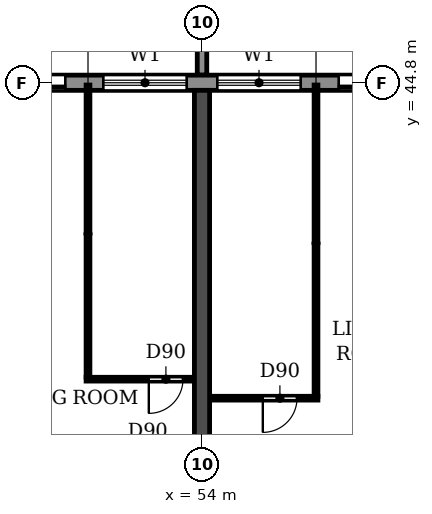
"""IFC4 building model, lengths in metres.
Left out: names, types, materials, properties, quantities, classifications, styles, units other than length and angle.
Written with IfcOpenShell. Run it as: python <this file> out.ifc"""

import sys

from ifc_helpers import new_model, si_unit, direction, frame, frame_2d, origin, place, context, subcontext, project, spatial, polyline, rectangle, outline, extrude, source, transform, mapped, element, fill, save


model = new_model("IFC4")
c1 = context("Model", 3, precision=1e-05, world=origin(), true_north=direction((0.0, 1.0)))
c2 = subcontext(c1, "Body", "Model", "MODEL_VIEW")
j1 = project(units=[si_unit("LENGTHUNIT", "METRE"), si_unit("PLANEANGLEUNIT", "RADIAN")], contexts=[c1])
p1 = place(None, origin())
s1 = spatial("IfcSite", under=j1, at=p1, CompositionType="ELEMENT")
p2 = place(p1, origin())
s2 = spatial("IfcBuilding", under=s1, at=p2, CompositionType="ELEMENT")
p3 = place(p2, frame((0.0, 0.0, 26.7)))
s3 = spatial("IfcBuildingStorey", under=s2, at=p3, CompositionType="ELEMENT", Elevation=26.7)
p4 = place(p3, frame((54.0, 30.55, 0.0), z_axis=(0.0, 0.0, 1.0), x_axis=(0.0, 1.0, 0.0)))
e1 = element("IfcWall", 1, at=p4, inside=s3, PredefinedType="SHEAR", context=c2, shape_type="SweptSolid", body=[
    extrude(rectangle(XDim=14.05, YDim=0.4, at=frame_2d((7.025, 0.0))), origin(), (0.0, 0.0, 1.0), 3.05),
])
p5 = place(p3, frame((97.317, 44.8, 0.0), z_axis=(0.0, 0.0, 1.0), x_axis=(-1.0, 0.0, 0.0)))
e2 = element("IfcWall", 2, at=p5, inside=s3, PredefinedType="STANDARD", context=c2, shape_type="SweptSolid", body=[
    extrude(rectangle(XDim=92.634, YDim=0.4, at=frame_2d((46.317, 0.0))), origin(), (0.0, 0.0, 1.0), 3.05),
])
p6 = place(p5, frame((88.717, 0.0, 0.9)))
e3 = element("IfcOpeningElement", 3, at=p6, cuts=e2, PredefinedType="OPENING", context=c2, shape_type="SweptSolid", body=[
    extrude(rectangle(XDim=2.2, YDim=1.5, at=frame_2d((1.1, 0.75))), frame((0.0, 0.21, 0.0), z_axis=(0.0, -1.0, 0.0), x_axis=(1.0, 0.0, 0.0)), (0.0, 0.0, 1.0), 0.42),
])
p7 = place(p5, frame((85.917, 0.0, 0.0)))
e4 = element("IfcOpeningElement", 4, at=p7, cuts=e2, PredefinedType="OPENING", context=c2, shape_type="SweptSolid", body=[
    extrude(rectangle(XDim=1.8, YDim=2.4, at=frame_2d((0.9, 1.2))), frame((0.0, 0.21, 0.0), z_axis=(0.0, -1.0, 0.0), x_axis=(1.0, 0.0, 0.0)), (0.0, 0.0, 1.0), 0.42),
])
p8 = place(p5, frame((82.717, 0.0, 0.9)))
e5 = element("IfcOpeningElement", 5, at=p8, cuts=e2, PredefinedType="OPENING", context=c2, shape_type="SweptSolid", body=[
    extrude(rectangle(XDim=2.2, YDim=1.5, at=frame_2d((1.1, 0.75))), frame((0.0, 0.21, 0.0), z_axis=(0.0, -1.0, 0.0), x_axis=(1.0, 0.0, 0.0)), (0.0, 0.0, 1.0), 0.42),
])
p9 = place(p5, frame((79.717, 0.0, 0.9)))
e6 = element("IfcOpeningElement", 6, at=p9, cuts=e2, PredefinedType="OPENING", context=c2, shape_type="SweptSolid", body=[
    extrude(rectangle(XDim=2.2, YDim=1.5, at=frame_2d((1.1, 0.75))), frame((0.0, 0.21, 0.0), z_axis=(0.0, -1.0, 0.0), x_axis=(1.0, 0.0, 0.0)), (0.0, 0.0, 1.0), 0.42),
])
p10 = place(p5, frame((76.917, 0.0, 0.0)))
e7 = element("IfcOpeningElement", 7, at=p10, cuts=e2, PredefinedType="OPENING", context=c2, shape_type="SweptSolid", body=[
    extrude(rectangle(XDim=1.8, YDim=2.4, at=frame_2d((0.9, 1.2))), frame((0.0, 0.21, 0.0), z_axis=(0.0, -1.0, 0.0), x_axis=(1.0, 0.0, 0.0)), (0.0, 0.0, 1.0), 0.42),
])
p11 = place(p5, frame((73.717, 0.0, 0.9)))
e8 = element("IfcOpeningElement", 8, at=p11, cuts=e2, PredefinedType="OPENING", context=c2, shape_type="SweptSolid", body=[
    extrude(rectangle(XDim=2.2, YDim=1.5, at=frame_2d((1.1, 0.75))), frame((0.0, 0.21, 0.0), z_axis=(0.0, -1.0, 0.0), x_axis=(1.0, 0.0, 0.0)), (0.0, 0.0, 1.0), 0.42),
])
p12 = place(p5, frame((70.717, 0.0, 0.9)))
e9 = element("IfcOpeningElement", 9, at=p12, cuts=e2, PredefinedType="OPENING", context=c2, shape_type="SweptSolid", body=[
    extrude(rectangle(XDim=2.2, YDim=1.5, at=frame_2d((1.1, 0.75))), frame((0.0, 0.21, 0.0), z_axis=(0.0, -1.0, 0.0), x_axis=(1.0, 0.0, 0.0)), (0.0, 0.0, 1.0), 0.42),
])
p13 = place(p5, frame((67.717, 0.0, 0.9)))
e10 = element("IfcOpeningElement", 10, at=p13, cuts=e2, PredefinedType="OPENING", context=c2, shape_type="SweptSolid", body=[
    extrude(rectangle(XDim=2.2, YDim=1.5, at=frame_2d((1.1, 0.75))), frame((0.0, 0.21, 0.0), z_axis=(0.0, -1.0, 0.0), x_axis=(1.0, 0.0, 0.0)), (0.0, 0.0, 1.0), 0.42),
])
p14 = place(p5, frame((64.917, 0.0, 0.0)))
e11 = element("IfcOpeningElement", 11, at=p14, cuts=e2, PredefinedType="OPENING", context=c2, shape_type="SweptSolid", body=[
    extrude(rectangle(XDim=1.8, YDim=2.4, at=frame_2d((0.9, 1.2))), frame((0.0, 0.21, 0.0), z_axis=(0.0, -1.0, 0.0), x_axis=(1.0, 0.0, 0.0)), (0.0, 0.0, 1.0), 0.42),
])
p15 = place(p5, frame((61.717, 0.0, 0.9)))
e12 = element("IfcOpeningElement", 12, at=p15, cuts=e2, PredefinedType="OPENING", context=c2, shape_type="SweptSolid", body=[
    extrude(rectangle(XDim=2.2, YDim=1.5, at=frame_2d((1.1, 0.75))), frame((0.0, 0.21, 0.0), z_axis=(0.0, -1.0, 0.0), x_axis=(1.0, 0.0, 0.0)), (0.0, 0.0, 1.0), 0.42),
])
p16 = place(p5, frame((58.717, 0.0, 0.9)))
e13 = element("IfcOpeningElement", 13, at=p16, cuts=e2, PredefinedType="OPENING", context=c2, shape_type="SweptSolid", body=[
    extrude(rectangle(XDim=2.2, YDim=1.5, at=frame_2d((1.1, 0.75))), frame((0.0, 0.21, 0.0), z_axis=(0.0, -1.0, 0.0), x_axis=(1.0, 0.0, 0.0)), (0.0, 0.0, 1.0), 0.42),
])
p17 = place(p5, frame((55.917, 0.0, 0.0)))
e14 = element("IfcOpeningElement", 14, at=p17, cuts=e2, PredefinedType="OPENING", context=c2, shape_type="SweptSolid", body=[
    extrude(rectangle(XDim=1.8, YDim=2.4, at=frame_2d((0.9, 1.2))), frame((0.0, 0.21, 0.0), z_axis=(0.0, -1.0, 0.0), x_axis=(1.0, 0.0, 0.0)), (0.0, 0.0, 1.0), 0.42),
])
p18 = place(p5, frame((52.917, 0.0, 0.0)))
e15 = element("IfcOpeningElement", 15, at=p18, cuts=e2, PredefinedType="OPENING", context=c2, shape_type="SweptSolid", body=[
    extrude(rectangle(XDim=1.8, YDim=2.4, at=frame_2d((0.9, 1.2))), frame((0.0, 0.21, 0.0), z_axis=(0.0, -1.0, 0.0), x_axis=(1.0, 0.0, 0.0)), (0.0, 0.0, 1.0), 0.42),
])
p19 = place(p5, frame((49.717, 0.0, 0.9)))
e16 = element("IfcOpeningElement", 16, at=p19, cuts=e2, PredefinedType="OPENING", context=c2, shape_type="SweptSolid", body=[
    extrude(rectangle(XDim=2.2, YDim=1.5, at=frame_2d((1.1, 0.75))), frame((0.0, 0.21, 0.0), z_axis=(0.0, -1.0, 0.0), x_axis=(1.0, 0.0, 0.0)), (0.0, 0.0, 1.0), 0.42),
])
p20 = place(p5, frame((46.917, 0.0, 0.0)))
e17 = element("IfcOpeningElement", 17, at=p20, cuts=e2, PredefinedType="OPENING", context=c2, shape_type="SweptSolid", body=[
    extrude(rectangle(XDim=1.8, YDim=2.4, at=frame_2d((0.9, 1.2))), frame((0.0, 0.21, 0.0), z_axis=(0.0, -1.0, 0.0), x_axis=(1.0, 0.0, 0.0)), (0.0, 0.0, 1.0), 0.42),
])
p21 = place(p5, frame((43.717, 0.0, 0.9)))
e18 = element("IfcOpeningElement", 18, at=p21, cuts=e2, PredefinedType="OPENING", context=c2, shape_type="SweptSolid", body=[
    extrude(rectangle(XDim=2.2, YDim=1.5, at=frame_2d((1.1, 0.75))), frame((0.0, 0.21, 0.0), z_axis=(0.0, -1.0, 0.0), x_axis=(1.0, 0.0, 0.0)), (0.0, 0.0, 1.0), 0.42),
])
p22 = place(p5, frame((40.717, 0.0, 0.9)))
e19 = element("IfcOpeningElement", 19, at=p22, cuts=e2, PredefinedType="OPENING", context=c2, shape_type="SweptSolid", body=[
    extrude(rectangle(XDim=2.2, YDim=1.5, at=frame_2d((1.1, 0.75))), frame((0.0, 0.21, 0.0), z_axis=(0.0, -1.0, 0.0), x_axis=(1.0, 0.0, 0.0)), (0.0, 0.0, 1.0), 0.42),
])
p23 = place(p5, frame((37.917, 0.0, 0.0)))
e20 = element("IfcOpeningElement", 20, at=p23, cuts=e2, PredefinedType="OPENING", context=c2, shape_type="SweptSolid", body=[
    extrude(rectangle(XDim=1.8, YDim=2.4, at=frame_2d((0.9, 1.2))), frame((0.0, 0.21, 0.0), z_axis=(0.0, -1.0, 0.0), x_axis=(1.0, 0.0, 0.0)), (0.0, 0.0, 1.0), 0.42),
])
p24 = place(p5, frame((34.917, 0.0, 0.0)))
e21 = element("IfcOpeningElement", 21, at=p24, cuts=e2, PredefinedType="OPENING", context=c2, shape_type="SweptSolid", body=[
    extrude(rectangle(XDim=1.8, YDim=2.4, at=frame_2d((0.9, 1.2))), frame((0.0, 0.21, 0.0), z_axis=(0.0, -1.0, 0.0), x_axis=(1.0, 0.0, 0.0)), (0.0, 0.0, 1.0), 0.42),
])
p25 = place(p5, frame((31.717, 0.0, 0.9)))
e22 = element("IfcOpeningElement", 22, at=p25, cuts=e2, PredefinedType="OPENING", context=c2, shape_type="SweptSolid", body=[
    extrude(rectangle(XDim=2.2, YDim=1.5, at=frame_2d((1.1, 0.75))), frame((0.0, 0.21, 0.0), z_axis=(0.0, -1.0, 0.0), x_axis=(1.0, 0.0, 0.0)), (0.0, 0.0, 1.0), 0.42),
])
p26 = place(p5, frame((28.717, 0.0, 0.9)))
e23 = element("IfcOpeningElement", 23, at=p26, cuts=e2, PredefinedType="OPENING", context=c2, shape_type="SweptSolid", body=[
    extrude(rectangle(XDim=2.2, YDim=1.5, at=frame_2d((1.1, 0.75))), frame((0.0, 0.21, 0.0), z_axis=(0.0, -1.0, 0.0), x_axis=(1.0, 0.0, 0.0)), (0.0, 0.0, 1.0), 0.42),
])
p27 = place(p5, frame((25.717, 0.0, 0.9)))
e24 = element("IfcOpeningElement", 24, at=p27, cuts=e2, PredefinedType="OPENING", context=c2, shape_type="SweptSolid", body=[
    extrude(rectangle(XDim=2.2, YDim=1.5, at=frame_2d((1.1, 0.75))), frame((0.0, 0.21, 0.0), z_axis=(0.0, -1.0, 0.0), x_axis=(1.0, 0.0, 0.0)), (0.0, 0.0, 1.0), 0.42),
])
p28 = place(p5, frame((22.717, 0.0, 0.9)))
e25 = element("IfcOpeningElement", 25, at=p28, cuts=e2, PredefinedType="OPENING", context=c2, shape_type="SweptSolid", body=[
    extrude(rectangle(XDim=2.2, YDim=1.5, at=frame_2d((1.1, 0.75))), frame((0.0, 0.21, 0.0), z_axis=(0.0, -1.0, 0.0), x_axis=(1.0, 0.0, 0.0)), (0.0, 0.0, 1.0), 0.42),
])
p29 = place(p5, frame((19.917, 0.0, 0.0)))
e26 = element("IfcOpeningElement", 26, at=p29, cuts=e2, PredefinedType="OPENING", context=c2, shape_type="SweptSolid", body=[
    extrude(rectangle(XDim=1.8, YDim=2.4, at=frame_2d((0.9, 1.2))), frame((0.0, 0.21, 0.0), z_axis=(0.0, -1.0, 0.0), x_axis=(1.0, 0.0, 0.0)), (0.0, 0.0, 1.0), 0.42),
])
p30 = place(p5, frame((16.717, 0.0, 0.9)))
e27 = element("IfcOpeningElement", 27, at=p30, cuts=e2, PredefinedType="OPENING", context=c2, shape_type="SweptSolid", body=[
    extrude(rectangle(XDim=2.2, YDim=1.5, at=frame_2d((1.1, 0.75))), frame((0.0, 0.21, 0.0), z_axis=(0.0, -1.0, 0.0), x_axis=(1.0, 0.0, 0.0)), (0.0, 0.0, 1.0), 0.42),
])
p31 = place(p5, frame((13.717, 0.0, 0.9)))
e28 = element("IfcOpeningElement", 28, at=p31, cuts=e2, PredefinedType="OPENING", context=c2, shape_type="SweptSolid", body=[
    extrude(rectangle(XDim=2.2, YDim=1.5, at=frame_2d((1.1, 0.75))), frame((0.0, 0.21, 0.0), z_axis=(0.0, -1.0, 0.0), x_axis=(1.0, 0.0, 0.0)), (0.0, 0.0, 1.0), 0.42),
])
p32 = place(p5, frame((10.717, 0.0, 0.9)))
e29 = element("IfcOpeningElement", 29, at=p32, cuts=e2, PredefinedType="OPENING", context=c2, shape_type="SweptSolid", body=[
    extrude(rectangle(XDim=2.2, YDim=1.5, at=frame_2d((1.1, 0.75))), frame((0.0, 0.21, 0.0), z_axis=(0.0, -1.0, 0.0), x_axis=(1.0, 0.0, 0.0)), (0.0, 0.0, 1.0), 0.42),
])
p33 = place(p5, frame((7.917, 0.0, 0.0)))
e30 = element("IfcOpeningElement", 30, at=p33, cuts=e2, PredefinedType="OPENING", context=c2, shape_type="SweptSolid", body=[
    extrude(rectangle(XDim=1.8, YDim=2.4, at=frame_2d((0.9, 1.2))), frame((0.0, 0.21, 0.0), z_axis=(0.0, -1.0, 0.0), x_axis=(1.0, 0.0, 0.0)), (0.0, 0.0, 1.0), 0.42),
])
p34 = place(p5, frame((4.917, 0.0, 0.0)))
e31 = element("IfcOpeningElement", 31, at=p34, cuts=e2, PredefinedType="OPENING", context=c2, shape_type="SweptSolid", body=[
    extrude(rectangle(XDim=1.8, YDim=2.4, at=frame_2d((0.9, 1.2))), frame((0.0, 0.21, 0.0), z_axis=(0.0, -1.0, 0.0), x_axis=(1.0, 0.0, 0.0)), (0.0, 0.0, 1.0), 0.42),
])
p35 = place(p5, frame((1.717, 0.0, 0.9)))
e32 = element("IfcOpeningElement", 32, at=p35, cuts=e2, PredefinedType="OPENING", context=c2, shape_type="SweptSolid", body=[
    extrude(rectangle(XDim=2.2, YDim=1.5, at=frame_2d((1.1, 0.75))), frame((0.0, 0.21, 0.0), z_axis=(0.0, -1.0, 0.0), x_axis=(1.0, 0.0, 0.0)), (0.0, 0.0, 1.0), 0.42),
])
m1 = source(origin(), c2, "Body", "SweptSolid", [
    extrude(outline(polyline([(0.0, 0.0), (0.25, 0.0), (0.25, 3.1), (0.0, 3.1), (0.0, 0.0)])), origin(), (0.0, 0.0, 1.0), 3.1),
])
p36 = place(p3, frame((53.875, 45.0, 0.0)))
e33 = element("IfcWall", 33, at=p36, inside=s3, PredefinedType="STANDARD", context=c2, shape_type="MappedRepresentation", body=[
    mapped(m1, transform((0.0, 0.0, 0.0))),
])
p37 = place(p3, frame((54.21, 36.5, 0.0), z_axis=(0.0, 0.0, 1.0), x_axis=(1.0, 0.0, 0.0)))
e34 = element("IfcWall", 34, at=p37, inside=s3, PredefinedType="PARTITIONING", context=c2, shape_type="SweptSolid", body=[
    extrude(rectangle(XDim=2.84, YDim=0.1, at=frame_2d((1.42, 0.0))), origin(), (0.0, 0.0, 1.0), 3.05),
])
p38 = place(p37, frame((1.39, 0.0, 0.0)))
e35 = element("IfcOpeningElement", 35, at=p38, cuts=e34, PredefinedType="OPENING", context=c2, shape_type="SweptSolid", body=[
    extrude(rectangle(XDim=0.9, YDim=2.1, at=frame_2d((0.45, 1.05))), frame((0.0, 0.06, 0.0), z_axis=(0.0, -1.0, 0.0), x_axis=(1.0, 0.0, 0.0)), (0.0, 0.0, 1.0), 0.12),
])
p39 = place(p3, frame((50.95, 37.0, 0.0), z_axis=(0.0, 0.0, 1.0), x_axis=(1.0, 0.0, 0.0)))
e36 = element("IfcWall", 36, at=p39, inside=s3, PredefinedType="PARTITIONING", context=c2, shape_type="SweptSolid", body=[
    extrude(rectangle(XDim=2.84, YDim=0.1, at=frame_2d((1.42, 0.0))), origin(), (0.0, 0.0, 1.0), 3.05),
])
p40 = place(p39, frame((1.65, 0.0, 0.0)))
e37 = element("IfcOpeningElement", 37, at=p40, cuts=e36, PredefinedType="OPENING", context=c2, shape_type="SweptSolid", body=[
    extrude(rectangle(XDim=0.9, YDim=2.1, at=frame_2d((0.45, 1.05))), frame((0.0, 0.06, 0.0), z_axis=(0.0, -1.0, 0.0), x_axis=(1.0, 0.0, 0.0)), (0.0, 0.0, 1.0), 0.12),
])
p41 = place(p3, frame((51.0, 37.05, 0.0), z_axis=(0.0, 0.0, 1.0), x_axis=(0.0, 1.0, 0.0)))
e38 = element("IfcWall", 38, at=p41, inside=s3, PredefinedType="PARTITIONING", context=c2, shape_type="SweptSolid", body=[
    extrude(rectangle(XDim=7.69, YDim=0.1, at=frame_2d((3.845, 0.0))), origin(), (0.0, 0.0, 1.0), 3.05),
])
p42 = place(p3, frame((57.0, 36.55, 0.0), z_axis=(0.0, 0.0, 1.0), x_axis=(0.0, 1.0, 0.0)))
e39 = element("IfcWall", 39, at=p42, inside=s3, PredefinedType="PARTITIONING", context=c2, shape_type="SweptSolid", body=[
    extrude(rectangle(XDim=8.19, YDim=0.1, at=frame_2d((4.095, 0.0))), origin(), (0.0, 0.0, 1.0), 3.05),
])
p43 = place(p20, origin())
e40 = element("IfcDoor", 40, at=p43, inside=s3, OperationType="DOUBLE_DOOR_SLIDING", PredefinedType="DOOR", context=c2, shape_type="SweptSolid", body=[
    extrude(rectangle(XDim=1.8, YDim=2.4, at=frame_2d((0.9, 1.2))), frame((0.0, 0.025, 0.0), z_axis=(0.0, -1.0, 0.0), x_axis=(1.0, 0.0, 0.0)), (0.0, 0.0, 1.0), 0.05),
])
fill(e17, e40)
p44 = place(p21, origin())
e41 = element("IfcWindow", 41, at=p44, inside=s3, PartitioningType="DOUBLE_PANEL_HORIZONTAL", PredefinedType="WINDOW", context=c2, shape_type="SweptSolid", body=[
    extrude(rectangle(XDim=2.2, YDim=1.5, at=frame_2d((1.1, 0.75))), frame((0.0, 0.03, 0.0), z_axis=(0.0, -1.0, 0.0), x_axis=(1.0, 0.0, 0.0)), (0.0, 0.0, 1.0), 0.06),
])
fill(e18, e41)
p45 = place(p22, origin())
e42 = element("IfcWindow", 42, at=p45, inside=s3, PartitioningType="DOUBLE_PANEL_HORIZONTAL", PredefinedType="WINDOW", context=c2, shape_type="SweptSolid", body=[
    extrude(rectangle(XDim=2.2, YDim=1.5, at=frame_2d((1.1, 0.75))), frame((0.0, 0.03, 0.0), z_axis=(0.0, -1.0, 0.0), x_axis=(1.0, 0.0, 0.0)), (0.0, 0.0, 1.0), 0.06),
])
fill(e19, e42)
p46 = place(p23, origin())
e43 = element("IfcDoor", 43, at=p46, inside=s3, OperationType="DOUBLE_DOOR_SLIDING", PredefinedType="DOOR", context=c2, shape_type="SweptSolid", body=[
    extrude(rectangle(XDim=1.8, YDim=2.4, at=frame_2d((0.9, 1.2))), frame((0.0, 0.025, 0.0), z_axis=(0.0, -1.0, 0.0), x_axis=(1.0, 0.0, 0.0)), (0.0, 0.0, 1.0), 0.05),
])
fill(e20, e43)
p47 = place(p40, frame((0.9, 0.0, 0.0), z_axis=(0.0, 0.0, 1.0), x_axis=(-1.0, 0.0, 0.0)))
e44 = element("IfcDoor", 44, at=p47, inside=s3, OperationType="SINGLE_SWING_RIGHT", PredefinedType="DOOR", context=c2, shape_type="SweptSolid", body=[
    extrude(rectangle(XDim=0.9, YDim=2.1, at=frame_2d((0.45, 1.05))), frame((0.0, 0.025, 0.0), z_axis=(0.0, -1.0, 0.0), x_axis=(1.0, 0.0, 0.0)), (0.0, 0.0, 1.0), 0.05),
])
fill(e37, e44)
p48 = place(p38, frame((0.9, 0.0, 0.0), z_axis=(0.0, 0.0, 1.0), x_axis=(-1.0, 0.0, 0.0)))
e45 = element("IfcDoor", 45, at=p48, inside=s3, OperationType="SINGLE_SWING_RIGHT", PredefinedType="DOOR", context=c2, shape_type="SweptSolid", body=[
    extrude(rectangle(XDim=0.9, YDim=2.1, at=frame_2d((0.45, 1.05))), frame((0.0, 0.025, 0.0), z_axis=(0.0, -1.0, 0.0), x_axis=(1.0, 0.0, 0.0)), (0.0, 0.0, 1.0), 0.05),
])
fill(e35, e45)
save(model, sys.argv[1])
